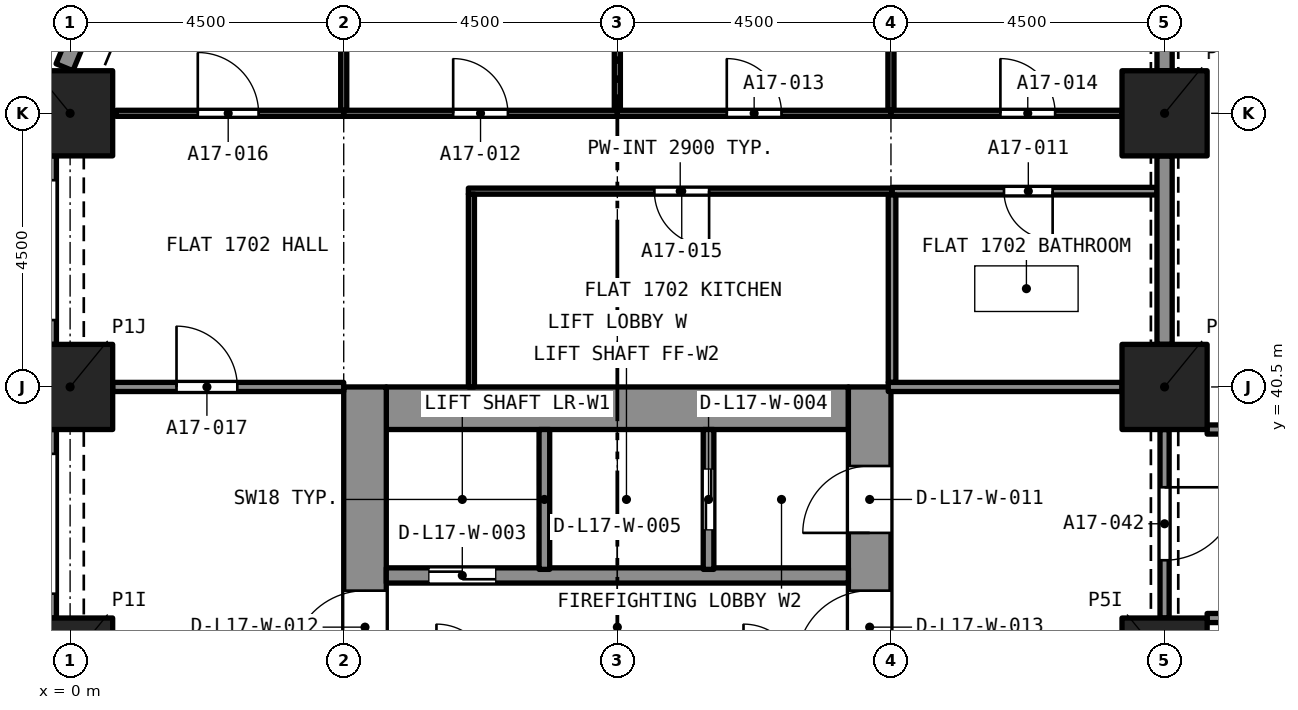
"""IFC4 building model, lengths in metres.
Left out: names, types, materials, properties, quantities, classifications, styles, units other than length and angle.
Written with IfcOpenShell. Run it as: python <this file> out.ifc"""

import sys

from ifc_helpers import new_model, si_unit, direction, frame, frame_2d, origin, origin_2d, place, context, subcontext, project, spatial, rectangle, extrude, element, fill, save


model = new_model("IFC4")
c1 = context("Model", 3, precision=1e-05, world=origin(), true_north=direction((0.0, 1.0)))
c2 = subcontext(c1, "Body", "Model", "MODEL_VIEW")
j1 = project(units=[si_unit("LENGTHUNIT", "METRE"), si_unit("PLANEANGLEUNIT", "RADIAN")], contexts=[c1])
p1 = place(None, origin())
s1 = spatial("IfcSite", under=j1, at=p1, CompositionType="ELEMENT")
p2 = place(p1, origin())
s2 = spatial("IfcBuilding", under=s1, at=p2, CompositionType="ELEMENT")
p3 = place(p2, frame((0.0, 0.0, 65.6)))
s3 = spatial("IfcBuildingStorey", under=s2, at=p3, CompositionType="ELEMENT", Elevation=65.6)
for number, where, z_axis, x_axis in (
    (1, (0.0, 36.0, 0.0), (0.0, 0.0, 1.0), (1.0, 0.0, 0.0)),
    (2, (18.0, 36.0, 0.0), (0.0, 0.0, 1.0), (1.0, 0.0, 0.0)),
    (3, (0.0, 40.5, 0.0), (0.0, 0.0, 1.0), (1.0, 0.0, 0.0)),
    (4, (18.0, 40.5, 0.0), (0.0, 0.0, 1.0), (1.0, 0.0, 0.0)),
    (5, (0.0, 45.0, 0.0), (0.0, 0.0, 1.0), (1.0, 0.0, 0.0)),
    (6, (18.0, 45.0, 0.0), (0.0, 0.0, 1.0), (1.0, 0.0, 0.0)),
):
    element("IfcColumn", number, at=place(p3, frame(where, z_axis=z_axis, x_axis=x_axis)), inside=s3, PredefinedType="COLUMN", context=c2, shape_type="SweptSolid", body=[
        extrude(rectangle(XDim=1.4, YDim=1.4, at=origin_2d()), origin(), (0.0, 0.0, 1.0), 3.2),
    ])
p4 = place(p3, frame((5.2, 40.15, 0.0), z_axis=(0.0, 0.0, 1.0), x_axis=(1.0, 0.0, 0.0)))
e7 = element("IfcWall", 7, at=p4, inside=s3, PredefinedType="SOLIDWALL", context=c2, shape_type="SweptSolid", body=[
    extrude(rectangle(XDim=7.6, YDim=0.7, at=frame_2d((3.8, 0.0))), origin(), (0.0, 0.0, 1.0), 3.2),
])
p5 = place(p3, frame((4.85, 27.0, 0.0), z_axis=(0.0, 0.0, 1.0), x_axis=(0.0, 1.0, 0.0)))
e8 = element("IfcWall", 8, at=p5, inside=s3, PredefinedType="SOLIDWALL", context=c2, shape_type="SweptSolid", body=[
    extrude(rectangle(XDim=13.5, YDim=0.7, at=frame_2d((6.75, 0.0))), origin(), (0.0, 0.0, 1.0), 3.2),
])
p6 = place(p5, frame((8.95, 0.0, 0.0)))
e9 = element("IfcOpeningElement", 9, at=p6, cuts=e8, PredefinedType="OPENING", context=c2, shape_type="SweptSolid", body=[
    extrude(rectangle(XDim=1.2, YDim=2.1, at=frame_2d((0.6, 1.05))), frame((0.0, 0.36, 0.0), z_axis=(0.0, -1.0, 0.0), x_axis=(1.0, 0.0, 0.0)), (0.0, 0.0, 1.0), 0.72),
])
p7 = place(p3, frame((13.15, 27.0, 0.0), z_axis=(0.0, 0.0, 1.0), x_axis=(0.0, 1.0, 0.0)))
e10 = element("IfcWall", 10, at=p7, inside=s3, PredefinedType="SOLIDWALL", context=c2, shape_type="SweptSolid", body=[
    extrude(rectangle(XDim=13.5, YDim=0.7, at=frame_2d((6.75, 0.0))), origin(), (0.0, 0.0, 1.0), 3.2),
])
p8 = place(p7, frame((11.1, 0.0, 0.0)))
e11 = element("IfcOpeningElement", 11, at=p8, cuts=e10, PredefinedType="OPENING", context=c2, shape_type="SweptSolid", body=[
    extrude(rectangle(XDim=1.1, YDim=2.1, at=frame_2d((0.55, 1.05))), frame((0.0, 0.36, 0.0), z_axis=(0.0, -1.0, 0.0), x_axis=(1.0, 0.0, 0.0)), (0.0, 0.0, 1.0), 0.72),
])
p9 = place(p7, frame((8.95, 0.0, 0.0)))
e12 = element("IfcOpeningElement", 12, at=p9, cuts=e10, PredefinedType="OPENING", context=c2, shape_type="SweptSolid", body=[
    extrude(rectangle(XDim=1.2, YDim=2.1, at=frame_2d((0.6, 1.05))), frame((0.0, 0.36, 0.0), z_axis=(0.0, -1.0, 0.0), x_axis=(1.0, 0.0, 0.0)), (0.0, 0.0, 1.0), 0.72),
])
p10 = place(p3, frame((-0.092, 45.757, 0.0), z_axis=(0.0, 0.0, 1.0), x_axis=(0.382737135771, 0.923857286003, 0.0)))
e13 = element("IfcWall", 13, at=p10, inside=s3, PredefinedType="SOLIDWALL", context=c2, shape_type="SweptSolid", body=[
    extrude(rectangle(XDim=1.865, YDim=0.3, at=frame_2d((0.933, 0.0))), origin(), (0.0, 0.0, 1.0), 3.2),
])
p11 = place(p10, frame((0.508, 0.0, 0.45)))
e14 = element("IfcOpeningElement", 14, at=p11, cuts=e13, PredefinedType="OPENING", context=c2, shape_type="SweptSolid", body=[
    extrude(rectangle(XDim=1.1, YDim=1.95, at=frame_2d((0.55, 0.975))), frame((0.0, 0.16, 0.0), z_axis=(0.0, -1.0, 0.0), x_axis=(1.0, 0.0, 0.0)), (0.0, 0.0, 1.0), 0.32),
])
p12 = place(p3, frame((-0.375, 41.2, 0.0), z_axis=(0.0, 0.0, 1.0), x_axis=(0.0, 1.0, 0.0)))
e15 = element("IfcWall", 15, at=p12, inside=s3, PredefinedType="SOLIDWALL", context=c2, shape_type="SweptSolid", body=[
    extrude(rectangle(XDim=3.1, YDim=0.3, at=frame_2d((1.55, 0.0))), origin(), (0.0, 0.0, 1.0), 3.2),
])
p13 = place(p12, frame((0.4, 0.0, 0.45)))
e16 = element("IfcOpeningElement", 16, at=p13, cuts=e15, PredefinedType="OPENING", context=c2, shape_type="SweptSolid", body=[
    extrude(rectangle(XDim=2.3, YDim=1.95, at=frame_2d((1.15, 0.975))), frame((0.0, 0.16, 0.0), z_axis=(0.0, -1.0, 0.0), x_axis=(1.0, 0.0, 0.0)), (0.0, 0.0, 1.0), 0.32),
])
p14 = place(p3, frame((-0.375, 36.7, 0.0), z_axis=(0.0, 0.0, 1.0), x_axis=(0.0, 1.0, 0.0)))
e17 = element("IfcWall", 17, at=p14, inside=s3, PredefinedType="SOLIDWALL", context=c2, shape_type="SweptSolid", body=[
    extrude(rectangle(XDim=3.1, YDim=0.3, at=frame_2d((1.55, 0.0))), origin(), (0.0, 0.0, 1.0), 3.2),
])
p15 = place(p14, frame((0.4, 0.0, 0.45)))
e18 = element("IfcOpeningElement", 18, at=p15, cuts=e17, PredefinedType="OPENING", context=c2, shape_type="SweptSolid", body=[
    extrude(rectangle(XDim=2.3, YDim=1.95, at=frame_2d((1.15, 0.975))), frame((0.0, 0.16, 0.0), z_axis=(0.0, -1.0, 0.0), x_axis=(1.0, 0.0, 0.0)), (0.0, 0.0, 1.0), 0.32),
])
p16 = place(p3, frame((17.875, 43.72, 0.0), z_axis=(0.0, 0.0, 1.0), x_axis=(-1.0, 0.0, 0.0)))
e19 = element("IfcWall", 19, at=p16, inside=s3, PredefinedType="PARTITIONING", context=c2, shape_type="SweptSolid", body=[
    extrude(rectangle(XDim=4.357, YDim=0.125, at=frame_2d((2.178, 0.0))), origin(), (0.0, 0.0, 1.0), 2.9),
])
p17 = place(p16, frame((1.716, 0.0, 0.0)))
e20 = element("IfcOpeningElement", 20, at=p17, cuts=e19, PredefinedType="OPENING", context=c2, shape_type="SweptSolid", body=[
    extrude(rectangle(XDim=0.8, YDim=2.1, at=frame_2d((0.4, 1.05))), frame((0.0, 0.073, 0.0), z_axis=(0.0, -1.0, 0.0), x_axis=(1.0, 0.0, 0.0)), (0.0, 0.0, 1.0), 0.145),
])
p18 = place(p3, frame((13.518, 40.575, 0.0), z_axis=(0.0, 0.0, 1.0), x_axis=(0.0, 1.0, 0.0)))
e21 = element("IfcWall", 21, at=p18, inside=s3, PredefinedType="PARTITIONING", context=c2, shape_type="SweptSolid", body=[
    extrude(rectangle(XDim=3.083, YDim=0.125, at=frame_2d((1.541, 0.0))), origin(), (0.0, 0.0, 1.0), 2.9),
])
p19 = place(p3, frame((18.0, 41.2, 0.0), z_axis=(0.0, 0.0, 1.0), x_axis=(0.0, 1.0, 0.0)))
e22 = element("IfcWall", 22, at=p19, inside=s3, PredefinedType="PARTITIONING", context=c2, shape_type="SweptSolid", body=[
    extrude(rectangle(XDim=3.1, YDim=0.25, at=frame_2d((1.55, 0.0))), origin(), (0.0, 0.0, 1.0), 2.38),
])
p20 = place(p3, frame((13.456, 40.5, 0.0), z_axis=(0.0, 0.0, 1.0), x_axis=(1.0, 0.0, 0.0)))
e23 = element("IfcWall", 23, at=p20, inside=s3, PredefinedType="PARTITIONING", context=c2, shape_type="SweptSolid", body=[
    extrude(rectangle(XDim=3.844, YDim=0.15, at=frame_2d((1.922, 0.0))), origin(), (0.0, 0.0, 1.0), 2.9),
])
p21 = place(p3, frame((9.0, 45.05, 0.0), z_axis=(0.0, 0.0, 1.0), x_axis=(0.0, 1.0, 0.0)))
e24 = element("IfcWall", 24, at=p21, inside=s3, PredefinedType="PARTITIONING", context=c2, shape_type="SweptSolid", body=[
    extrude(rectangle(XDim=3.75, YDim=0.1, at=frame_2d((1.875, 0.0))), origin(), (0.0, 0.0, 1.0), 2.9),
])
p22 = place(p3, frame((4.5, 45.0, 0.0), z_axis=(0.0, 0.0, 1.0), x_axis=(1.0, 0.0, 0.0)))
e25 = element("IfcWall", 25, at=p22, inside=s3, PredefinedType="PARTITIONING", context=c2, shape_type="SweptSolid", body=[
    extrude(rectangle(XDim=4.5, YDim=0.1, at=frame_2d((2.25, 0.0))), origin(), (0.0, 0.0, 1.0), 2.9),
])
p23 = place(p22, frame((1.8, 0.0, 0.0)))
e26 = element("IfcOpeningElement", 26, at=p23, cuts=e25, PredefinedType="OPENING", context=c2, shape_type="SweptSolid", body=[
    extrude(rectangle(XDim=0.9, YDim=2.1, at=frame_2d((0.45, 1.05))), frame((0.0, 0.06, 0.0), z_axis=(0.0, -1.0, 0.0), x_axis=(1.0, 0.0, 0.0)), (0.0, 0.0, 1.0), 0.12),
])
p24 = place(p3, frame((4.5, 45.05, 0.0), z_axis=(0.0, 0.0, 1.0), x_axis=(0.0, 1.0, 0.0)))
e27 = element("IfcWall", 27, at=p24, inside=s3, PredefinedType="PARTITIONING", context=c2, shape_type="SweptSolid", body=[
    extrude(rectangle(XDim=3.692, YDim=0.1, at=frame_2d((1.846, 0.0))), origin(), (0.0, 0.0, 1.0), 2.9),
])
p25 = place(p3, frame((13.5, 45.05, 0.0), z_axis=(0.0, 0.0, 1.0), x_axis=(0.0, 1.0, 0.0)))
e28 = element("IfcWall", 28, at=p25, inside=s3, PredefinedType="PARTITIONING", context=c2, shape_type="SweptSolid", body=[
    extrude(rectangle(XDim=3.75, YDim=0.1, at=frame_2d((1.875, 0.0))), origin(), (0.0, 0.0, 1.0), 2.9),
])
p26 = place(p3, frame((9.0, 45.0, 0.0), z_axis=(0.0, 0.0, 1.0), x_axis=(1.0, 0.0, 0.0)))
e29 = element("IfcWall", 29, at=p26, inside=s3, PredefinedType="PARTITIONING", context=c2, shape_type="SweptSolid", body=[
    extrude(rectangle(XDim=4.5, YDim=0.1, at=frame_2d((2.25, 0.0))), origin(), (0.0, 0.0, 1.0), 2.9),
])
p27 = place(p26, frame((1.8, 0.0, 0.0)))
e30 = element("IfcOpeningElement", 30, at=p27, cuts=e29, PredefinedType="OPENING", context=c2, shape_type="SweptSolid", body=[
    extrude(rectangle(XDim=0.9, YDim=2.1, at=frame_2d((0.45, 1.05))), frame((0.0, 0.06, 0.0), z_axis=(0.0, -1.0, 0.0), x_axis=(1.0, 0.0, 0.0)), (0.0, 0.0, 1.0), 0.12),
])
p28 = place(p3, frame((13.5, 45.0, 0.0), z_axis=(0.0, 0.0, 1.0), x_axis=(1.0, 0.0, 0.0)))
e31 = element("IfcWall", 31, at=p28, inside=s3, PredefinedType="PARTITIONING", context=c2, shape_type="SweptSolid", body=[
    extrude(rectangle(XDim=3.8, YDim=0.1, at=frame_2d((1.9, 0.0))), origin(), (0.0, 0.0, 1.0), 2.9),
])
p29 = place(p28, frame((1.8, 0.0, 0.0)))
e32 = element("IfcOpeningElement", 32, at=p29, cuts=e31, PredefinedType="OPENING", context=c2, shape_type="SweptSolid", body=[
    extrude(rectangle(XDim=0.9, YDim=2.1, at=frame_2d((0.45, 1.05))), frame((0.0, 0.06, 0.0), z_axis=(0.0, -1.0, 0.0), x_axis=(1.0, 0.0, 0.0)), (0.0, 0.0, 1.0), 0.12),
])
p30 = place(p3, frame((18.0, 45.7, 0.0), z_axis=(0.0, 0.0, 1.0), x_axis=(0.0, 1.0, 0.0)))
e33 = element("IfcWall", 33, at=p30, inside=s3, PredefinedType="PARTITIONING", context=c2, shape_type="SweptSolid", body=[
    extrude(rectangle(XDim=3.1, YDim=0.25, at=frame_2d((1.55, 0.0))), origin(), (0.0, 0.0, 1.0), 2.38),
])
p31 = place(p3, frame((13.518, 43.72, 0.0), z_axis=(0.0, 0.0, 1.0), x_axis=(-1.0, 0.0, 0.0)))
e34 = element("IfcWall", 34, at=p31, inside=s3, PredefinedType="PARTITIONING", context=c2, shape_type="SweptSolid", body=[
    extrude(rectangle(XDim=6.968, YDim=0.1, at=frame_2d((3.484, 0.0))), origin(), (0.0, 0.0, 1.0), 2.9),
])
p32 = place(p31, frame((3.009, 0.0, 0.0)))
e35 = element("IfcOpeningElement", 35, at=p32, cuts=e34, PredefinedType="OPENING", context=c2, shape_type="SweptSolid", body=[
    extrude(rectangle(XDim=0.9, YDim=2.1, at=frame_2d((0.45, 1.05))), frame((0.0, 0.06, 0.0), z_axis=(0.0, -1.0, 0.0), x_axis=(1.0, 0.0, 0.0)), (0.0, 0.0, 1.0), 0.12),
])
p33 = place(p3, frame((6.6, 40.5, 0.0), z_axis=(0.0, 0.0, 1.0), x_axis=(0.0, 1.0, 0.0)))
e36 = element("IfcWall", 36, at=p33, inside=s3, PredefinedType="PARTITIONING", context=c2, shape_type="SweptSolid", body=[
    extrude(rectangle(XDim=3.17, YDim=0.1, at=frame_2d((1.585, 0.0))), origin(), (0.0, 0.0, 1.0), 2.9),
])
p34 = place(p3, frame((0.758, 45.0, 0.0), z_axis=(0.0, 0.0, 1.0), x_axis=(1.0, 0.0, 0.0)))
e37 = element("IfcWall", 37, at=p34, inside=s3, PredefinedType="PARTITIONING", context=c2, shape_type="SweptSolid", body=[
    extrude(rectangle(XDim=3.742, YDim=0.1, at=frame_2d((1.871, 0.0))), origin(), (0.0, 0.0, 1.0), 2.9),
])
p35 = place(p34, frame((1.342, 0.0, 0.0)))
e38 = element("IfcOpeningElement", 38, at=p35, cuts=e37, PredefinedType="OPENING", context=c2, shape_type="SweptSolid", body=[
    extrude(rectangle(XDim=1.0, YDim=2.1, at=frame_2d((0.5, 1.05))), frame((0.0, 0.06, 0.0), z_axis=(0.0, -1.0, 0.0), x_axis=(1.0, 0.0, 0.0)), (0.0, 0.0, 1.0), 0.12),
])
p36 = place(p3, frame((0.7, 40.5, 0.0), z_axis=(0.0, 0.0, 1.0), x_axis=(1.0, 0.0, 0.0)))
e39 = element("IfcWall", 39, at=p36, inside=s3, PredefinedType="PARTITIONING", context=c2, shape_type="SweptSolid", body=[
    extrude(rectangle(XDim=3.8, YDim=0.15, at=frame_2d((1.9, 0.0))), origin(), (0.0, 0.0, 1.0), 2.9),
])
p37 = place(p36, frame((1.05, 0.0, 0.0)))
e40 = element("IfcOpeningElement", 40, at=p37, cuts=e39, PredefinedType="OPENING", context=c2, shape_type="SweptSolid", body=[
    extrude(rectangle(XDim=1.0, YDim=2.1, at=frame_2d((0.5, 1.05))), frame((0.0, 0.085, 0.0), z_axis=(0.0, -1.0, 0.0), x_axis=(1.0, 0.0, 0.0)), (0.0, 0.0, 1.0), 0.17),
])
p38 = place(p3, frame((18.7, 39.8, 0.0), z_axis=(0.0, 0.0, 1.0), x_axis=(1.0, 0.0, 0.0)))
e41 = element("IfcWall", 41, at=p38, inside=s3, PredefinedType="PARTITIONING", context=c2, shape_type="SweptSolid", body=[
    extrude(rectangle(XDim=8.3, YDim=0.15, at=frame_2d((4.15, 0.0))), origin(), (0.0, 0.0, 1.0), 2.75),
])
p39 = place(p38, frame((3.3, 0.0, 0.0)))
e42 = element("IfcOpeningElement", 42, at=p39, cuts=e41, PredefinedType="OPENING", context=c2, shape_type="SweptSolid", body=[
    extrude(rectangle(XDim=1.0, YDim=2.1, at=frame_2d((0.5, 1.05))), frame((0.0, 0.085, 0.0), z_axis=(0.0, -1.0, 0.0), x_axis=(1.0, 0.0, 0.0)), (0.0, 0.0, 1.0), 0.17),
])
p40 = place(p3, frame((30.8, 36.7, 0.0), z_axis=(0.0, 0.0, 1.0), x_axis=(-1.0, 0.0, 0.0)))
e43 = element("IfcWall", 43, at=p40, inside=s3, PredefinedType="PARTITIONING", context=c2, shape_type="SweptSolid", body=[
    extrude(rectangle(XDim=12.1, YDim=0.15, at=frame_2d((6.05, 0.0))), origin(), (0.0, 0.0, 1.0), 2.75),
])
p41 = place(p40, frame((5.55, 0.0, 0.0)))
e44 = element("IfcOpeningElement", 44, at=p41, cuts=e43, PredefinedType="OPENING", context=c2, shape_type="SweptSolid", body=[
    extrude(rectangle(XDim=1.0, YDim=2.1, at=frame_2d((0.5, 1.05))), frame((0.0, 0.085, 0.0), z_axis=(0.0, -1.0, 0.0), x_axis=(1.0, 0.0, 0.0)), (0.0, 0.0, 1.0), 0.17),
])
p42 = place(p3, frame((18.0, 39.8, 0.0), z_axis=(0.0, 0.0, 1.0), x_axis=(0.0, -1.0, 0.0)))
e45 = element("IfcWall", 45, at=p42, inside=s3, PredefinedType="PARTITIONING", context=c2, shape_type="SweptSolid", body=[
    extrude(rectangle(XDim=3.1, YDim=0.15, at=frame_2d((1.55, 0.0))), origin(), (0.0, 0.0, 1.0), 2.38),
])
p43 = place(p42, frame((0.95, 0.0, 0.0)))
e46 = element("IfcOpeningElement", 46, at=p43, cuts=e45, PredefinedType="OPENING", context=c2, shape_type="SweptSolid", body=[
    extrude(rectangle(XDim=1.2, YDim=2.1, at=frame_2d((0.6, 1.05))), frame((0.0, 0.085, 0.0), z_axis=(0.0, -1.0, 0.0), x_axis=(1.0, 0.0, 0.0)), (0.0, 0.0, 1.0), 0.17),
])
p44 = place(p3, frame((5.2, 37.4, 0.0), z_axis=(0.0, 0.0, 1.0), x_axis=(1.0, 0.0, 0.0)))
e47 = element("IfcWall", 47, at=p44, inside=s3, PredefinedType="SOLIDWALL", context=c2, shape_type="SweptSolid", body=[
    extrude(rectangle(XDim=7.6, YDim=0.25, at=frame_2d((3.8, 0.0))), origin(), (0.0, 0.0, 1.0), 2.9),
])
p45 = place(p44, frame((0.7, 0.0, 0.0)))
e48 = element("IfcOpeningElement", 48, at=p45, cuts=e47, PredefinedType="OPENING", context=c2, shape_type="SweptSolid", body=[
    extrude(rectangle(XDim=1.1, YDim=2.4, at=frame_2d((0.55, 1.2))), frame((0.0, 0.135, 0.0), z_axis=(0.0, -1.0, 0.0), x_axis=(1.0, 0.0, 0.0)), (0.0, 0.0, 1.0), 0.27),
])
p46 = place(p3, frame((7.8, 37.5, 0.0), z_axis=(0.0, 0.0, 1.0), x_axis=(0.0, 1.0, 0.0)))
e49 = element("IfcWall", 49, at=p46, inside=s3, PredefinedType="SOLIDWALL", context=c2, shape_type="SweptSolid", body=[
    extrude(rectangle(XDim=2.3, YDim=0.175, at=frame_2d((1.15, 0.0))), origin(), (0.0, 0.0, 1.0), 2.9),
])
p47 = place(p3, frame((10.5, 37.5, 0.0), z_axis=(0.0, 0.0, 1.0), x_axis=(0.0, 1.0, 0.0)))
e50 = element("IfcWall", 50, at=p47, inside=s3, PredefinedType="SOLIDWALL", context=c2, shape_type="SweptSolid", body=[
    extrude(rectangle(XDim=2.3, YDim=0.175, at=frame_2d((1.15, 0.0))), origin(), (0.0, 0.0, 1.0), 2.9),
])
p48 = place(p47, frame((0.65, 0.0, 0.0)))
e51 = element("IfcOpeningElement", 51, at=p48, cuts=e50, PredefinedType="OPENING", context=c2, shape_type="SweptSolid", body=[
    extrude(rectangle(XDim=1.0, YDim=2.1, at=frame_2d((0.5, 1.05))), frame((0.0, 0.097, 0.0), z_axis=(0.0, -1.0, 0.0), x_axis=(1.0, 0.0, 0.0)), (0.0, 0.0, 1.0), 0.195),
])
p49 = place(p17, origin())
e52 = element("IfcDoor", 52, at=p49, inside=s3, OperationType="SINGLE_SWING_LEFT", PredefinedType="DOOR", context=c2, shape_type="SweptSolid", body=[
    extrude(rectangle(XDim=0.8, YDim=2.1, at=frame_2d((0.4, 1.05))), frame((0.0, 0.025, 0.0), z_axis=(0.0, -1.0, 0.0), x_axis=(1.0, 0.0, 0.0)), (0.0, 0.0, 1.0), 0.05),
])
fill(e20, e52)
p50 = place(p23, origin())
e53 = element("IfcDoor", 53, at=p50, inside=s3, OperationType="SINGLE_SWING_RIGHT", PredefinedType="DOOR", context=c2, shape_type="SweptSolid", body=[
    extrude(rectangle(XDim=0.9, YDim=2.1, at=frame_2d((0.45, 1.05))), frame((0.0, 0.025, 0.0), z_axis=(0.0, -1.0, 0.0), x_axis=(1.0, 0.0, 0.0)), (0.0, 0.0, 1.0), 0.05),
])
fill(e26, e53)
p51 = place(p27, origin())
e54 = element("IfcDoor", 54, at=p51, inside=s3, OperationType="SINGLE_SWING_LEFT", PredefinedType="DOOR", context=c2, shape_type="SweptSolid", body=[
    extrude(rectangle(XDim=0.9, YDim=2.1, at=frame_2d((0.45, 1.05))), frame((0.0, 0.025, 0.0), z_axis=(0.0, -1.0, 0.0), x_axis=(1.0, 0.0, 0.0)), (0.0, 0.0, 1.0), 0.05),
])
fill(e30, e54)
p52 = place(p29, origin())
e55 = element("IfcDoor", 55, at=p52, inside=s3, OperationType="SINGLE_SWING_RIGHT", PredefinedType="DOOR", context=c2, shape_type="SweptSolid", body=[
    extrude(rectangle(XDim=0.9, YDim=2.1, at=frame_2d((0.45, 1.05))), frame((0.0, 0.025, 0.0), z_axis=(0.0, -1.0, 0.0), x_axis=(1.0, 0.0, 0.0)), (0.0, 0.0, 1.0), 0.05),
])
fill(e32, e55)
p53 = place(p32, origin())
e56 = element("IfcDoor", 56, at=p53, inside=s3, OperationType="SINGLE_SWING_LEFT", PredefinedType="DOOR", context=c2, shape_type="SweptSolid", body=[
    extrude(rectangle(XDim=0.9, YDim=2.1, at=frame_2d((0.45, 1.05))), frame((0.0, 0.025, 0.0), z_axis=(0.0, -1.0, 0.0), x_axis=(1.0, 0.0, 0.0)), (0.0, 0.0, 1.0), 0.05),
])
fill(e35, e56)
p54 = place(p35, origin())
e57 = element("IfcDoor", 57, at=p54, inside=s3, OperationType="SINGLE_SWING_LEFT", PredefinedType="DOOR", context=c2, shape_type="SweptSolid", body=[
    extrude(rectangle(XDim=1.0, YDim=2.1, at=frame_2d((0.5, 1.05))), frame((0.0, 0.025, 0.0), z_axis=(0.0, -1.0, 0.0), x_axis=(1.0, 0.0, 0.0)), (0.0, 0.0, 1.0), 0.05),
])
fill(e38, e57)
p55 = place(p37, origin())
e58 = element("IfcDoor", 58, at=p55, inside=s3, OperationType="SINGLE_SWING_LEFT", PredefinedType="DOOR", context=c2, shape_type="SweptSolid", body=[
    extrude(rectangle(XDim=1.0, YDim=2.1, at=frame_2d((0.5, 1.05))), frame((0.0, 0.025, 0.0), z_axis=(0.0, -1.0, 0.0), x_axis=(1.0, 0.0, 0.0)), (0.0, 0.0, 1.0), 0.05),
])
fill(e40, e58)
p56 = place(p43, origin())
e59 = element("IfcDoor", 59, at=p56, inside=s3, OperationType="SINGLE_SWING_LEFT", PredefinedType="DOOR", context=c2, shape_type="SweptSolid", body=[
    extrude(rectangle(XDim=1.2, YDim=2.1, at=frame_2d((0.6, 1.05))), frame((0.0, 0.025, 0.0), z_axis=(0.0, -1.0, 0.0), x_axis=(1.0, 0.0, 0.0)), (0.0, 0.0, 1.0), 0.05),
])
fill(e46, e59)
p57 = place(p45, origin())
e60 = element("IfcDoor", 60, at=p57, inside=s3, OperationType="SLIDING_TO_LEFT", PredefinedType="DOOR", context=c2, shape_type="SweptSolid", body=[
    extrude(rectangle(XDim=1.1, YDim=2.4, at=frame_2d((0.55, 1.2))), frame((0.0, 0.025, 0.0), z_axis=(0.0, -1.0, 0.0), x_axis=(1.0, 0.0, 0.0)), (0.0, 0.0, 1.0), 0.05),
])
fill(e48, e60)
p58 = place(p48, origin())
e61 = element("IfcDoor", 61, at=p58, inside=s3, OperationType="SLIDING_TO_LEFT", PredefinedType="DOOR", context=c2, shape_type="SweptSolid", body=[
    extrude(rectangle(XDim=1.0, YDim=2.1, at=frame_2d((0.5, 1.05))), frame((0.0, 0.025, 0.0), z_axis=(0.0, -1.0, 0.0), x_axis=(1.0, 0.0, 0.0)), (0.0, 0.0, 1.0), 0.05),
])
fill(e51, e61)
p59 = place(p8, origin())
e62 = element("IfcDoor", 62, at=p59, inside=s3, OperationType="SINGLE_SWING_LEFT", PredefinedType="DOOR", context=c2, shape_type="SweptSolid", body=[
    extrude(rectangle(XDim=1.1, YDim=2.1, at=frame_2d((0.55, 1.05))), frame((0.0, 0.025, 0.0), z_axis=(0.0, -1.0, 0.0), x_axis=(1.0, 0.0, 0.0)), (0.0, 0.0, 1.0), 0.05),
])
fill(e11, e62)
p60 = place(p6, origin())
e63 = element("IfcDoor", 63, at=p60, inside=s3, OperationType="SINGLE_SWING_LEFT", PredefinedType="DOOR", context=c2, shape_type="SweptSolid", body=[
    extrude(rectangle(XDim=1.2, YDim=2.1, at=frame_2d((0.6, 1.05))), frame((0.0, 0.025, 0.0), z_axis=(0.0, -1.0, 0.0), x_axis=(1.0, 0.0, 0.0)), (0.0, 0.0, 1.0), 0.05),
])
fill(e9, e63)
p61 = place(p9, origin())
e64 = element("IfcDoor", 64, at=p61, inside=s3, OperationType="SINGLE_SWING_LEFT", PredefinedType="DOOR", context=c2, shape_type="SweptSolid", body=[
    extrude(rectangle(XDim=1.2, YDim=2.1, at=frame_2d((0.6, 1.05))), frame((0.0, 0.025, 0.0), z_axis=(0.0, -1.0, 0.0), x_axis=(1.0, 0.0, 0.0)), (0.0, 0.0, 1.0), 0.05),
])
fill(e12, e64)
save(model, sys.argv[1])
